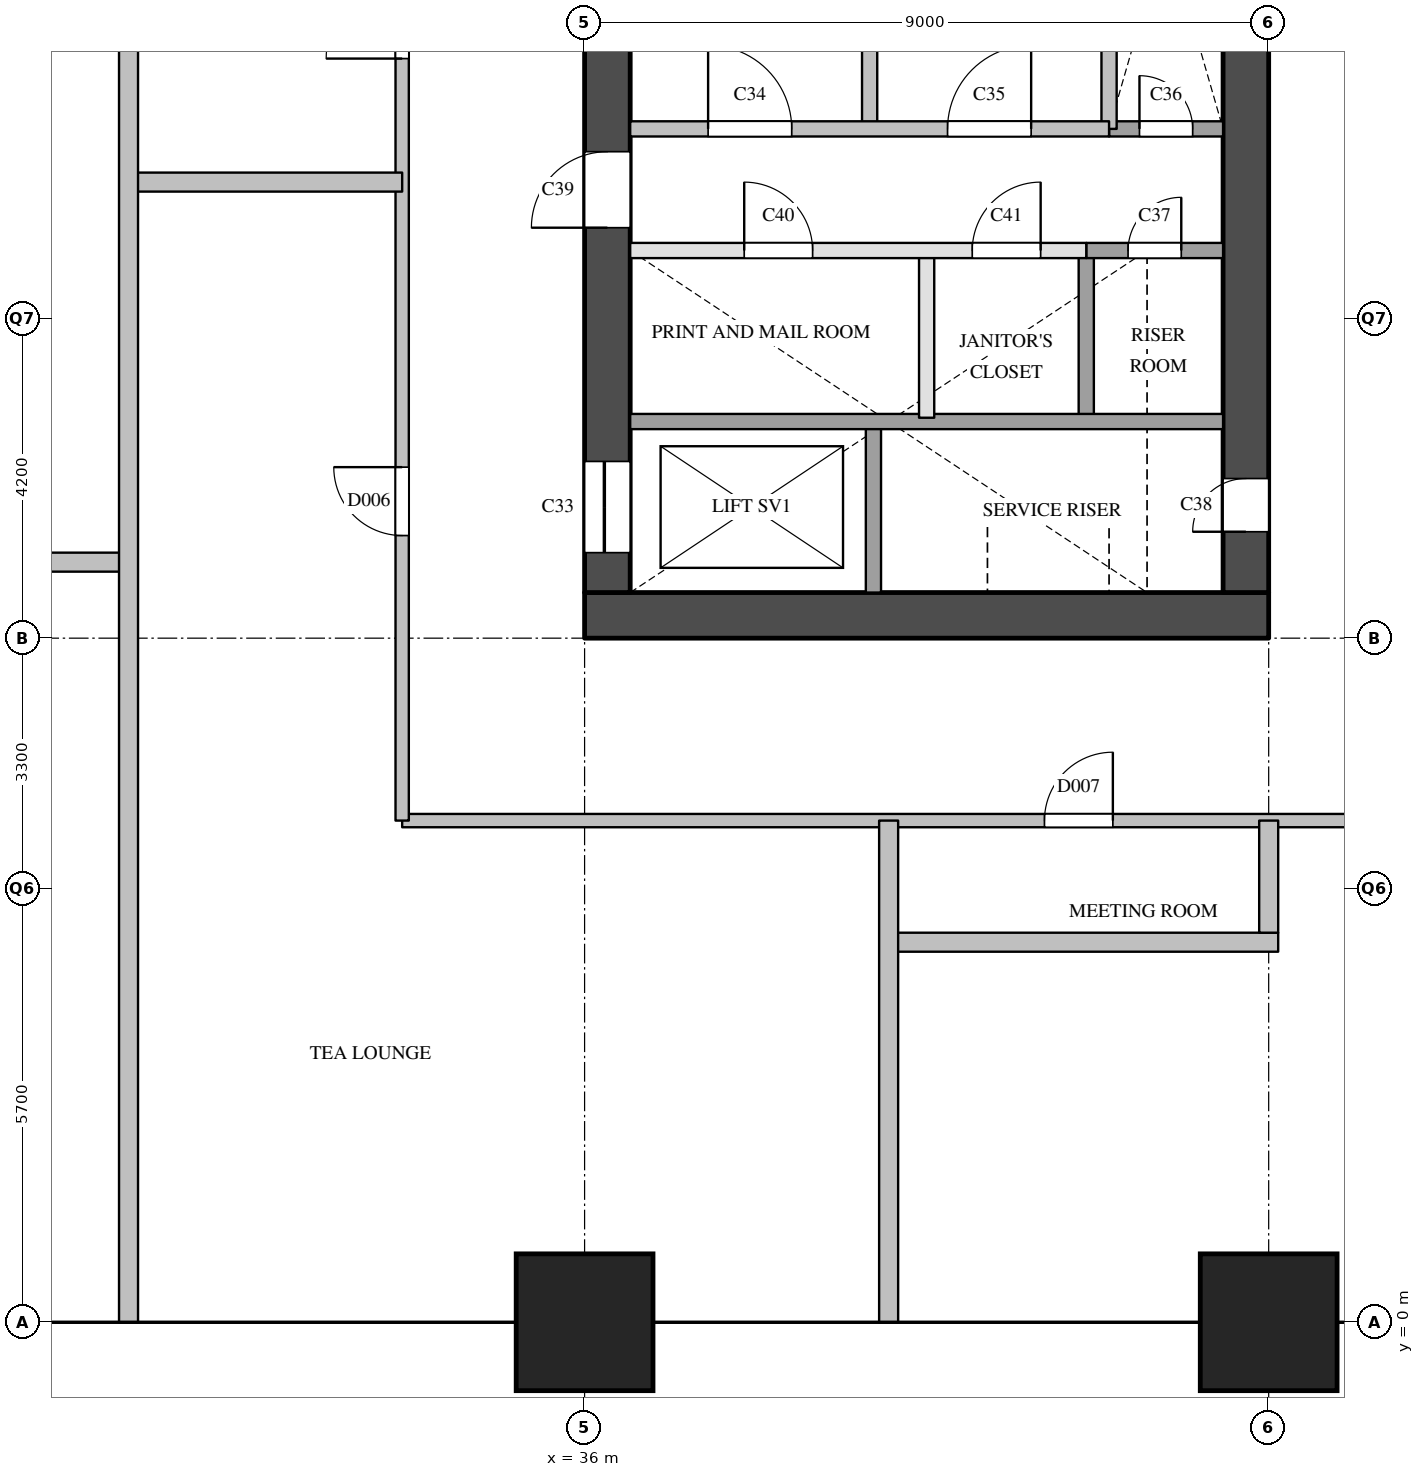
"""IFC4 building model, lengths in metres.
Left out: names, types, materials, properties, quantities, classifications, styles, units other than length and angle.
Written with IfcOpenShell. Run it as: python <this file> out.ifc"""

import sys

from ifc_helpers import new_model, si_unit, direction, frame, frame_2d, origin, origin_2d, place, context, subcontext, project, spatial, rectangle, extrude, element, fill, save


model = new_model("IFC4")
c1 = context("Model", 3, precision=1e-05, world=origin(), true_north=direction((0.0, 1.0)))
c2 = subcontext(c1, "Body", "Model", "MODEL_VIEW")
j1 = project(units=[si_unit("LENGTHUNIT", "METRE"), si_unit("PLANEANGLEUNIT", "RADIAN")], contexts=[c1])
p1 = place(None, origin())
s1 = spatial("IfcSite", under=j1, at=p1, CompositionType="ELEMENT")
p2 = place(p1, origin())
s2 = spatial("IfcBuilding", under=s1, at=p2, CompositionType="ELEMENT")
p3 = place(p2, frame((0.0, 0.0, 50.0)))
s3 = spatial("IfcBuildingStorey", under=s2, at=p3, CompositionType="ELEMENT", Elevation=50.0)
for number, where, z_axis, x_axis in (
    (1, (36.0, 0.0, 0.0), (0.0, 0.0, 1.0), (1.0, 0.0, 0.0)),
    (2, (45.0, 0.0, 0.0), (0.0, 0.0, 1.0), (1.0, 0.0, 0.0)),
):
    element("IfcColumn", number, at=place(p3, frame(where, z_axis=z_axis, x_axis=x_axis)), inside=s3, PredefinedType="COLUMN", context=c2, shape_type="SweptSolid", body=[
        extrude(rectangle(XDim=1.8, YDim=1.8, at=origin_2d()), origin(), (0.0, 0.0, 1.0), 3.8),
    ])
p4 = place(p3, frame((36.0, 9.3, 0.0), z_axis=(0.0, 0.0, 1.0), x_axis=(1.0, 0.0, 0.0)))
e3 = element("IfcWall", 3, at=p4, inside=s3, PredefinedType="SHEAR", context=c2, shape_type="SweptSolid", body=[
    extrude(rectangle(XDim=9.0, YDim=0.6, at=frame_2d((4.5, 0.0))), origin(), (0.0, 0.0, 1.0), 3.5),
])
p5 = place(p3, frame((36.3, 9.6, 0.0), z_axis=(0.0, 0.0, 1.0), x_axis=(0.0, 1.0, 0.0)))
e4 = element("IfcWall", 4, at=p5, inside=s3, PredefinedType="SHEAR", context=c2, shape_type="SweptSolid", body=[
    extrude(rectangle(XDim=12.3, YDim=0.6, at=frame_2d((6.15, 0.0))), origin(), (0.0, 0.0, 1.0), 3.5),
])
p6 = place(p5, frame((0.525, 0.0, 0.0)))
e5 = element("IfcOpeningElement", 5, at=p6, cuts=e4, PredefinedType="OPENING", context=c2, shape_type="SweptSolid", body=[
    extrude(rectangle(XDim=1.2, YDim=2.1, at=frame_2d((0.6, 1.05))), frame((0.0, 0.31, 0.0), z_axis=(0.0, -1.0, 0.0), x_axis=(1.0, 0.0, 0.0)), (0.0, 0.0, 1.0), 0.62),
])
p7 = place(p5, frame((4.8, 0.0, 0.0)))
e6 = element("IfcOpeningElement", 6, at=p7, cuts=e4, PredefinedType="OPENING", context=c2, shape_type="SweptSolid", body=[
    extrude(rectangle(XDim=1.0, YDim=2.1, at=frame_2d((0.5, 1.05))), frame((0.0, 0.31, 0.0), z_axis=(0.0, -1.0, 0.0), x_axis=(1.0, 0.0, 0.0)), (0.0, 0.0, 1.0), 0.62),
])
p8 = place(p3, frame((44.7, 9.6, 0.0), z_axis=(0.0, 0.0, 1.0), x_axis=(0.0, 1.0, 0.0)))
e7 = element("IfcWall", 7, at=p8, inside=s3, PredefinedType="SHEAR", context=c2, shape_type="SweptSolid", body=[
    extrude(rectangle(XDim=12.3, YDim=0.6, at=frame_2d((6.15, 0.0))), origin(), (0.0, 0.0, 1.0), 3.5),
])
p9 = place(p8, frame((0.8, 0.0, 0.0)))
e8 = element("IfcOpeningElement", 8, at=p9, cuts=e7, PredefinedType="OPENING", context=c2, shape_type="SweptSolid", body=[
    extrude(rectangle(XDim=0.7, YDim=2.1, at=frame_2d((0.35, 1.05))), frame((0.0, 0.31, 0.0), z_axis=(0.0, -1.0, 0.0), x_axis=(1.0, 0.0, 0.0)), (0.0, 0.0, 1.0), 0.62),
])
p10 = place(p3, frame((39.75, 15.7, 0.0), z_axis=(0.0, 0.0, 1.0), x_axis=(0.0, 1.0, 0.0)))
e9 = element("IfcWall", 9, at=p10, inside=s3, PredefinedType="SOLIDWALL", context=c2, shape_type="SweptSolid", body=[
    extrude(rectangle(XDim=4.3, YDim=0.2, at=frame_2d((2.15, 0.0))), origin(), (0.0, 0.0, 1.0), 3.5),
])
p11 = place(p3, frame((39.8, 9.6, 0.0), z_axis=(0.0, 0.0, 1.0), x_axis=(0.0, 1.0, 0.0)))
e10 = element("IfcWall", 10, at=p11, inside=s3, PredefinedType="SOLIDWALL", context=c2, shape_type="SweptSolid", body=[
    extrude(rectangle(XDim=2.3, YDim=0.2, at=frame_2d((1.15, 0.0))), origin(), (0.0, 0.0, 1.0), 3.5),
])
p12 = place(p3, frame((40.5, 11.9, 0.0), z_axis=(0.0, 0.0, 1.0), x_axis=(0.0, 1.0, 0.0)))
e11 = element("IfcWall", 11, at=p12, inside=s3, PredefinedType="PARTITIONING", context=c2, shape_type="SweptSolid", body=[
    extrude(rectangle(XDim=2.2, YDim=0.2, at=frame_2d((1.1, 0.0))), origin(), (0.0, 0.0, 1.0), 3.5),
])
p13 = place(p3, frame((42.6, 11.9, 0.0), z_axis=(0.0, 0.0, 1.0), x_axis=(0.0, 1.0, 0.0)))
e12 = element("IfcWall", 12, at=p13, inside=s3, PredefinedType="SOLIDWALL", context=c2, shape_type="SweptSolid", body=[
    extrude(rectangle(XDim=2.2, YDim=0.2, at=frame_2d((1.1, 0.0))), origin(), (0.0, 0.0, 1.0), 3.5),
])
p14 = place(p3, frame((42.9, 15.7, 0.0), z_axis=(0.0, 0.0, 1.0), x_axis=(0.0, 1.0, 0.0)))
e13 = element("IfcWall", 13, at=p14, inside=s3, PredefinedType="SOLIDWALL", context=c2, shape_type="SweptSolid", body=[
    extrude(rectangle(XDim=4.3, YDim=0.2, at=frame_2d((2.15, 0.0))), origin(), (0.0, 0.0, 1.0), 3.5),
])
p15 = place(p3, frame((36.6, 11.85, 0.0), z_axis=(0.0, 0.0, 1.0), x_axis=(1.0, 0.0, 0.0)))
e14 = element("IfcWall", 14, at=p15, inside=s3, PredefinedType="SOLIDWALL", context=c2, shape_type="SweptSolid", body=[
    extrude(rectangle(XDim=7.8, YDim=0.2, at=frame_2d((3.9, 0.0))), origin(), (0.0, 0.0, 1.0), 3.5),
])
p16 = place(p3, frame((36.6, 14.1, 0.0), z_axis=(0.0, 0.0, 1.0), x_axis=(1.0, 0.0, 0.0)))
e15 = element("IfcWall", 15, at=p16, inside=s3, PredefinedType="PARTITIONING", context=c2, shape_type="SweptSolid", body=[
    extrude(rectangle(XDim=6.0, YDim=0.2, at=frame_2d((3.0, 0.0))), origin(), (0.0, 0.0, 1.0), 3.5),
])
p17 = place(p16, frame((1.5, 0.0, 0.0)))
e16 = element("IfcOpeningElement", 16, at=p17, cuts=e15, PredefinedType="OPENING", context=c2, shape_type="SweptSolid", body=[
    extrude(rectangle(XDim=0.9, YDim=2.1, at=frame_2d((0.45, 1.05))), frame((0.0, 0.11, 0.0), z_axis=(0.0, -1.0, 0.0), x_axis=(1.0, 0.0, 0.0)), (0.0, 0.0, 1.0), 0.22),
])
p18 = place(p16, frame((4.5, 0.0, 0.0)))
e17 = element("IfcOpeningElement", 17, at=p18, cuts=e15, PredefinedType="OPENING", context=c2, shape_type="SweptSolid", body=[
    extrude(rectangle(XDim=0.9, YDim=2.1, at=frame_2d((0.45, 1.05))), frame((0.0, 0.11, 0.0), z_axis=(0.0, -1.0, 0.0), x_axis=(1.0, 0.0, 0.0)), (0.0, 0.0, 1.0), 0.22),
])
p19 = place(p3, frame((42.6, 14.1, 0.0), z_axis=(0.0, 0.0, 1.0), x_axis=(1.0, 0.0, 0.0)))
e18 = element("IfcWall", 18, at=p19, inside=s3, PredefinedType="SOLIDWALL", context=c2, shape_type="SweptSolid", body=[
    extrude(rectangle(XDim=1.8, YDim=0.2, at=frame_2d((0.9, 0.0))), origin(), (0.0, 0.0, 1.0), 3.5),
])
p20 = place(p19, frame((0.55, 0.0, 0.0)))
e19 = element("IfcOpeningElement", 19, at=p20, cuts=e18, PredefinedType="OPENING", context=c2, shape_type="SweptSolid", body=[
    extrude(rectangle(XDim=0.7, YDim=2.1, at=frame_2d((0.35, 1.05))), frame((0.0, 0.11, 0.0), z_axis=(0.0, -1.0, 0.0), x_axis=(1.0, 0.0, 0.0)), (0.0, 0.0, 1.0), 0.22),
])
p21 = place(p3, frame((42.9, 15.7, 0.0), z_axis=(0.0, 0.0, 1.0), x_axis=(1.0, 0.0, 0.0)))
e20 = element("IfcWall", 20, at=p21, inside=s3, PredefinedType="SOLIDWALL", context=c2, shape_type="SweptSolid", body=[
    extrude(rectangle(XDim=1.5, YDim=0.2, at=frame_2d((0.75, 0.0))), origin(), (0.0, 0.0, 1.0), 3.5),
])
p22 = place(p21, frame((0.4, 0.0, 0.0)))
e21 = element("IfcOpeningElement", 21, at=p22, cuts=e20, PredefinedType="OPENING", context=c2, shape_type="SweptSolid", body=[
    extrude(rectangle(XDim=0.7, YDim=2.1, at=frame_2d((0.35, 1.05))), frame((0.0, 0.11, 0.0), z_axis=(0.0, -1.0, 0.0), x_axis=(1.0, 0.0, 0.0)), (0.0, 0.0, 1.0), 0.22),
])
p23 = place(p3, frame((36.6, 15.7, 0.0), z_axis=(0.0, 0.0, 1.0), x_axis=(1.0, 0.0, 0.0)))
e22 = element("IfcWall", 22, at=p23, inside=s3, PredefinedType="SOLIDWALL", context=c2, shape_type="SweptSolid", body=[
    extrude(rectangle(XDim=6.3, YDim=0.2, at=frame_2d((3.15, 0.0))), origin(), (0.0, 0.0, 1.0), 3.5),
])
p24 = place(p23, frame((1.025, 0.0, 0.0)))
e23 = element("IfcOpeningElement", 23, at=p24, cuts=e22, PredefinedType="OPENING", context=c2, shape_type="SweptSolid", body=[
    extrude(rectangle(XDim=1.1, YDim=2.1, at=frame_2d((0.55, 1.05))), frame((0.0, 0.11, 0.0), z_axis=(0.0, -1.0, 0.0), x_axis=(1.0, 0.0, 0.0)), (0.0, 0.0, 1.0), 0.22),
])
p25 = place(p23, frame((4.175, 0.0, 0.0)))
e24 = element("IfcOpeningElement", 24, at=p25, cuts=e22, PredefinedType="OPENING", context=c2, shape_type="SweptSolid", body=[
    extrude(rectangle(XDim=1.1, YDim=2.1, at=frame_2d((0.55, 1.05))), frame((0.0, 0.11, 0.0), z_axis=(0.0, -1.0, 0.0), x_axis=(1.0, 0.0, 0.0)), (0.0, 0.0, 1.0), 0.22),
])
p26 = place(p3, frame((33.6, 6.6, 0.0), z_axis=(0.0, 0.0, 1.0), x_axis=(1.0, 0.0, 0.0)))
e25 = element("IfcWall", 25, at=p26, inside=s3, PredefinedType="PARTITIONING", context=c2, shape_type="SweptSolid", body=[
    extrude(rectangle(XDim=13.8, YDim=0.175, at=frame_2d((6.9, 0.0))), origin(), (0.0, 0.0, 1.0), 3.5),
])
p27 = place(p26, frame((8.45, 0.0, 0.0)))
e26 = element("IfcOpeningElement", 26, at=p27, cuts=e25, PredefinedType="OPENING", context=c2, shape_type="SweptSolid", body=[
    extrude(rectangle(XDim=0.9, YDim=2.1, at=frame_2d((0.45, 1.05))), frame((0.0, 0.097, 0.0), z_axis=(0.0, -1.0, 0.0), x_axis=(1.0, 0.0, 0.0)), (0.0, 0.0, 1.0), 0.195),
])
p28 = place(p3, frame((33.6, 6.6, 0.0), z_axis=(0.0, 0.0, 1.0), x_axis=(0.0, 1.0, 0.0)))
e27 = element("IfcWall", 27, at=p28, inside=s3, PredefinedType="PARTITIONING", context=c2, shape_type="SweptSolid", body=[
    extrude(rectangle(XDim=12.65, YDim=0.175, at=frame_2d((6.325, 0.0))), origin(), (0.0, 0.0, 1.0), 3.5),
])
p29 = place(p28, frame((3.75, 0.0, 0.0)))
e28 = element("IfcOpeningElement", 28, at=p29, cuts=e27, PredefinedType="OPENING", context=c2, shape_type="SweptSolid", body=[
    extrude(rectangle(XDim=0.9, YDim=2.1, at=frame_2d((0.45, 1.05))), frame((0.0, 0.097, 0.0), z_axis=(0.0, -1.0, 0.0), x_axis=(1.0, 0.0, 0.0)), (0.0, 0.0, 1.0), 0.195),
])
p30 = place(p28, frame((10.025, 0.0, 0.0)))
e29 = element("IfcOpeningElement", 29, at=p30, cuts=e27, PredefinedType="OPENING", context=c2, shape_type="SweptSolid", body=[
    extrude(rectangle(XDim=1.0, YDim=2.1, at=frame_2d((0.5, 1.05))), frame((0.0, 0.097, 0.0), z_axis=(0.0, -1.0, 0.0), x_axis=(1.0, 0.0, 0.0)), (0.0, 0.0, 1.0), 0.195),
])
p31 = place(p3, frame((40.0, 5.0, 0.0), z_axis=(0.0, 0.0, 1.0), x_axis=(1.0, 0.0, 0.0)))
e30 = element("IfcWall", 30, at=p31, inside=s3, PredefinedType="PARTITIONING", context=c2, shape_type="SweptSolid", body=[
    extrude(rectangle(XDim=5.125, YDim=0.25, at=frame_2d((2.562, 0.0))), origin(), (0.0, 0.0, 1.0), 3.5),
])
p32 = place(p3, frame((20.4, 10.0, 0.0), z_axis=(0.0, 0.0, 1.0), x_axis=(1.0, 0.0, 0.0)))
e31 = element("IfcWall", 31, at=p32, inside=s3, PredefinedType="PARTITIONING", context=c2, shape_type="SweptSolid", body=[
    extrude(rectangle(XDim=9.6, YDim=0.25, at=frame_2d((4.8, 0.0))), origin(), (0.0, 0.0, 1.0), 2.5),
])
p33 = place(p3, frame((30.0, 15.0, 0.0), z_axis=(0.0, 0.0, 1.0), x_axis=(1.0, 0.0, 0.0)))
e32 = element("IfcWall", 32, at=p33, inside=s3, PredefinedType="PARTITIONING", context=c2, shape_type="SweptSolid", body=[
    extrude(rectangle(XDim=3.6, YDim=0.25, at=frame_2d((1.8, 0.0))), origin(), (0.0, 0.0, 1.0), 3.5),
])
p34 = place(p3, frame((30.0, 0.0, 0.0), z_axis=(0.0, 0.0, 1.0), x_axis=(0.0, 1.0, 0.0)))
e33 = element("IfcWall", 33, at=p34, inside=s3, PredefinedType="PARTITIONING", context=c2, shape_type="SweptSolid", body=[
    extrude(rectangle(XDim=19.25, YDim=0.25, at=frame_2d((9.625, 0.0))), origin(), (0.0, 0.0, 1.0), 2.5),
])
p35 = place(p3, frame((40.0, 0.0, 0.0), z_axis=(0.0, 0.0, 1.0), x_axis=(0.0, 1.0, 0.0)))
e34 = element("IfcWall", 34, at=p35, inside=s3, PredefinedType="PARTITIONING", context=c2, shape_type="SweptSolid", body=[
    extrude(rectangle(XDim=6.6, YDim=0.25, at=frame_2d((3.3, 0.0))), origin(), (0.0, 0.0, 1.0), 2.5),
])
p36 = place(p3, frame((45.0, 5.125, 0.0), z_axis=(0.0, 0.0, 1.0), x_axis=(0.0, 1.0, 0.0)))
e35 = element("IfcWall", 35, at=p36, inside=s3, PredefinedType="PARTITIONING", context=c2, shape_type="SweptSolid", body=[
    extrude(rectangle(XDim=1.475, YDim=0.25, at=frame_2d((0.738, 0.0))), origin(), (0.0, 0.0, 1.0), 3.5),
])
p37 = place(p6, origin())
e36 = element("IfcDoor", 36, at=p37, inside=s3, OperationType="SLIDING_TO_LEFT", PredefinedType="DOOR", context=c2, shape_type="SweptSolid", body=[
    extrude(rectangle(XDim=1.2, YDim=2.1, at=frame_2d((0.6, 1.05))), frame((0.0, 0.025, 0.0), z_axis=(0.0, -1.0, 0.0), x_axis=(1.0, 0.0, 0.0)), (0.0, 0.0, 1.0), 0.05),
])
fill(e5, e36)
p38 = place(p24, origin())
e37 = element("IfcDoor", 37, at=p38, inside=s3, OperationType="SINGLE_SWING_LEFT", PredefinedType="DOOR", context=c2, shape_type="SweptSolid", body=[
    extrude(rectangle(XDim=1.1, YDim=2.1, at=frame_2d((0.55, 1.05))), frame((0.0, 0.025, 0.0), z_axis=(0.0, -1.0, 0.0), x_axis=(1.0, 0.0, 0.0)), (0.0, 0.0, 1.0), 0.05),
])
fill(e23, e37)
p39 = place(p25, origin())
e38 = element("IfcDoor", 38, at=p39, inside=s3, OperationType="SINGLE_SWING_RIGHT", PredefinedType="DOOR", context=c2, shape_type="SweptSolid", body=[
    extrude(rectangle(XDim=1.1, YDim=2.1, at=frame_2d((0.55, 1.05))), frame((0.0, 0.025, 0.0), z_axis=(0.0, -1.0, 0.0), x_axis=(1.0, 0.0, 0.0)), (0.0, 0.0, 1.0), 0.05),
])
fill(e24, e38)
p40 = place(p22, origin())
e39 = element("IfcDoor", 39, at=p40, inside=s3, OperationType="SINGLE_SWING_LEFT", PredefinedType="DOOR", context=c2, shape_type="SweptSolid", body=[
    extrude(rectangle(XDim=0.7, YDim=2.1, at=frame_2d((0.35, 1.05))), frame((0.0, 0.025, 0.0), z_axis=(0.0, -1.0, 0.0), x_axis=(1.0, 0.0, 0.0)), (0.0, 0.0, 1.0), 0.05),
])
fill(e21, e39)
p41 = place(p20, origin())
e40 = element("IfcDoor", 40, at=p41, inside=s3, OperationType="SINGLE_SWING_RIGHT", PredefinedType="DOOR", context=c2, shape_type="SweptSolid", body=[
    extrude(rectangle(XDim=0.7, YDim=2.1, at=frame_2d((0.35, 1.05))), frame((0.0, 0.025, 0.0), z_axis=(0.0, -1.0, 0.0), x_axis=(1.0, 0.0, 0.0)), (0.0, 0.0, 1.0), 0.05),
])
fill(e19, e40)
p42 = place(p9, origin())
e41 = element("IfcDoor", 41, at=p42, inside=s3, OperationType="SINGLE_SWING_LEFT", PredefinedType="DOOR", context=c2, shape_type="SweptSolid", body=[
    extrude(rectangle(XDim=0.7, YDim=2.1, at=frame_2d((0.35, 1.05))), frame((0.0, 0.025, 0.0), z_axis=(0.0, -1.0, 0.0), x_axis=(1.0, 0.0, 0.0)), (0.0, 0.0, 1.0), 0.05),
])
fill(e8, e41)
p43 = place(p7, origin())
e42 = element("IfcDoor", 42, at=p43, inside=s3, OperationType="SINGLE_SWING_LEFT", PredefinedType="DOOR", context=c2, shape_type="SweptSolid", body=[
    extrude(rectangle(XDim=1.0, YDim=2.1, at=frame_2d((0.5, 1.05))), frame((0.0, 0.025, 0.0), z_axis=(0.0, -1.0, 0.0), x_axis=(1.0, 0.0, 0.0)), (0.0, 0.0, 1.0), 0.05),
])
fill(e6, e42)
p44 = place(p17, origin())
e43 = element("IfcDoor", 43, at=p44, inside=s3, OperationType="SINGLE_SWING_LEFT", PredefinedType="DOOR", context=c2, shape_type="SweptSolid", body=[
    extrude(rectangle(XDim=0.9, YDim=2.1, at=frame_2d((0.45, 1.05))), frame((0.0, 0.025, 0.0), z_axis=(0.0, -1.0, 0.0), x_axis=(1.0, 0.0, 0.0)), (0.0, 0.0, 1.0), 0.05),
])
fill(e16, e43)
p45 = place(p18, origin())
e44 = element("IfcDoor", 44, at=p45, inside=s3, OperationType="SINGLE_SWING_RIGHT", PredefinedType="DOOR", context=c2, shape_type="SweptSolid", body=[
    extrude(rectangle(XDim=0.9, YDim=2.1, at=frame_2d((0.45, 1.05))), frame((0.0, 0.025, 0.0), z_axis=(0.0, -1.0, 0.0), x_axis=(1.0, 0.0, 0.0)), (0.0, 0.0, 1.0), 0.05),
])
fill(e17, e44)
p46 = place(p29, origin())
e45 = element("IfcDoor", 45, at=p46, inside=s3, OperationType="SINGLE_SWING_RIGHT", PredefinedType="DOOR", context=c2, shape_type="SweptSolid", body=[
    extrude(rectangle(XDim=0.9, YDim=2.1, at=frame_2d((0.45, 1.05))), frame((0.0, 0.025, 0.0), z_axis=(0.0, -1.0, 0.0), x_axis=(1.0, 0.0, 0.0)), (0.0, 0.0, 1.0), 0.05),
])
fill(e28, e45)
p47 = place(p27, origin())
e46 = element("IfcDoor", 46, at=p47, inside=s3, OperationType="SINGLE_SWING_RIGHT", PredefinedType="DOOR", context=c2, shape_type="SweptSolid", body=[
    extrude(rectangle(XDim=0.9, YDim=2.1, at=frame_2d((0.45, 1.05))), frame((0.0, 0.025, 0.0), z_axis=(0.0, -1.0, 0.0), x_axis=(1.0, 0.0, 0.0)), (0.0, 0.0, 1.0), 0.05),
])
fill(e26, e46)
p48 = place(p30, origin())
e47 = element("IfcDoor", 47, at=p48, inside=s3, OperationType="SINGLE_SWING_LEFT", PredefinedType="DOOR", context=c2, shape_type="SweptSolid", body=[
    extrude(rectangle(XDim=1.0, YDim=2.1, at=frame_2d((0.5, 1.05))), frame((0.0, 0.025, 0.0), z_axis=(0.0, -1.0, 0.0), x_axis=(1.0, 0.0, 0.0)), (0.0, 0.0, 1.0), 0.05),
])
fill(e29, e47)
save(model, sys.argv[1])
